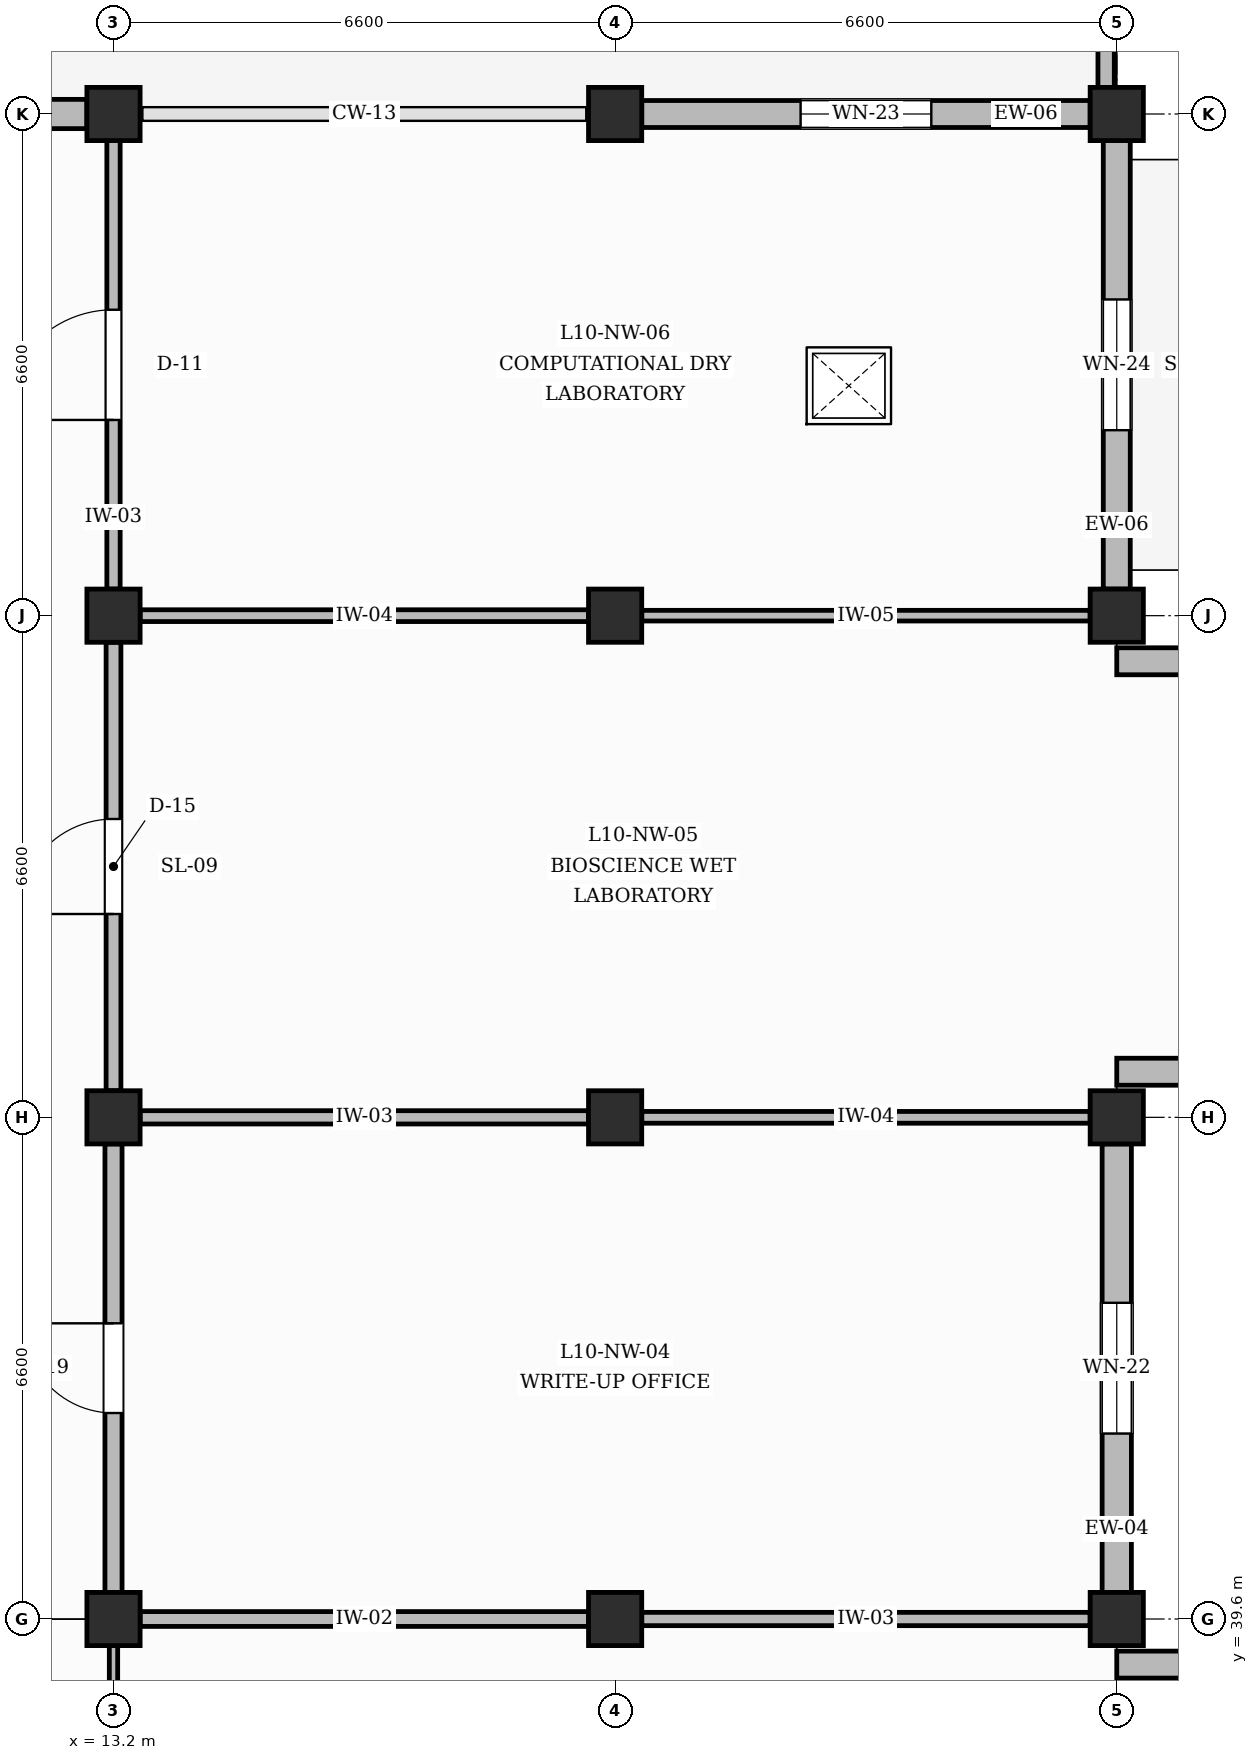
"""IFC4 building model, lengths in metres.
Left out: names, types, materials, properties, quantities, classifications, styles, units other than length and angle.
Written with IfcOpenShell. Run it as: python <this file> out.ifc"""

import sys

from ifc_helpers import new_model, si_unit, direction, frame, frame_2d, origin, origin_2d, place, context, subcontext, project, spatial, rectangle, extrude, element, fill, save


model = new_model("IFC4")
c1 = context("Model", 3, precision=1e-05, world=origin(), true_north=direction((0.0, 1.0)))
c2 = subcontext(c1, "Body", "Model", "MODEL_VIEW")
j1 = project(units=[si_unit("LENGTHUNIT", "METRE"), si_unit("PLANEANGLEUNIT", "RADIAN")], contexts=[c1])
p1 = place(None, origin())
s1 = spatial("IfcSite", under=j1, at=p1, CompositionType="ELEMENT")
p2 = place(p1, origin())
s2 = spatial("IfcBuilding", under=s1, at=p2, CompositionType="ELEMENT")
p3 = place(p2, frame((0.0, 0.0, 43.8)))
s3 = spatial("IfcBuildingStorey", under=s2, at=p3, CompositionType="ELEMENT", Elevation=43.8)
for number, where, z_axis, x_axis in (
    (1, (13.2, 39.6, 0.0), (0.0, 0.0, 1.0), (1.0, 0.0, 0.0)),
    (2, (13.2, 46.2, 0.0), (0.0, 0.0, 1.0), (1.0, 0.0, 0.0)),
    (3, (13.2, 52.8, 0.0), (0.0, 0.0, 1.0), (1.0, 0.0, 0.0)),
    (4, (13.2, 59.4, 0.0), (0.0, 0.0, 1.0), (1.0, 0.0, 0.0)),
    (5, (19.8, 39.6, 0.0), (0.0, 0.0, 1.0), (1.0, 0.0, 0.0)),
    (6, (19.8, 46.2, 0.0), (0.0, 0.0, 1.0), (1.0, 0.0, 0.0)),
    (7, (19.8, 52.8, 0.0), (0.0, 0.0, 1.0), (1.0, 0.0, 0.0)),
    (8, (19.8, 59.4, 0.0), (0.0, 0.0, 1.0), (1.0, 0.0, 0.0)),
    (9, (26.4, 39.6, 0.0), (0.0, 0.0, 1.0), (1.0, 0.0, 0.0)),
    (10, (26.4, 46.2, 0.0), (0.0, 0.0, 1.0), (1.0, 0.0, 0.0)),
    (11, (26.4, 52.8, 0.0), (0.0, 0.0, 1.0), (1.0, 0.0, 0.0)),
    (12, (26.4, 59.4, 0.0), (0.0, 0.0, 1.0), (1.0, 0.0, 0.0)),
):
    element("IfcColumn", number, at=place(p3, frame(where, z_axis=z_axis, x_axis=x_axis)), inside=s3, PredefinedType="COLUMN", context=c2, shape_type="SweptSolid", body=[
        extrude(rectangle(XDim=0.7, YDim=0.7, at=origin_2d()), origin(), (0.0, 0.0, 1.0), 4.2),
    ])
p4 = place(p3, frame((6.95, 59.4, 0.0), z_axis=(0.0, 0.0, 1.0), x_axis=(1.0, 0.0, 0.0)))
e13 = element("IfcWall", 13, at=p4, inside=s3, PredefinedType="SOLIDWALL", context=c2, shape_type="SweptSolid", body=[
    extrude(rectangle(XDim=5.9, YDim=0.385, at=frame_2d((2.95, 0.0))), origin(), (0.0, 0.0, 1.0), 3.29),
])
p5 = place(p4, frame((2.19, 0.0, 0.95)))
e14 = element("IfcOpeningElement", 14, at=p5, cuts=e13, PredefinedType="OPENING", context=c2, shape_type="SweptSolid", body=[
    extrude(rectangle(XDim=1.52, YDim=1.96, at=frame_2d((0.76, 0.98))), frame((0.0, 0.202, 0.0), z_axis=(0.0, -1.0, 0.0), x_axis=(1.0, 0.0, 0.0)), (0.0, 0.0, 1.0), 0.405),
])
p6 = place(p3, frame((26.4, 39.0, 0.0), z_axis=(0.0, 0.0, 1.0), x_axis=(1.0, 0.0, 0.0)))
e15 = element("IfcWall", 15, at=p6, inside=s3, PredefinedType="SOLIDWALL", context=c2, shape_type="SweptSolid", body=[
    extrude(rectangle(XDim=2.0, YDim=0.355, at=frame_2d((1.0, 0.0))), origin(), (0.0, 0.0, 1.0), 3.29),
])
p7 = place(p3, frame((26.4, 39.95, 0.0), z_axis=(0.0, 0.0, 1.0), x_axis=(0.0, 1.0, 0.0)))
e16 = element("IfcWall", 16, at=p7, inside=s3, PredefinedType="SOLIDWALL", context=c2, shape_type="SweptSolid", body=[
    extrude(rectangle(XDim=5.9, YDim=0.385, at=frame_2d((2.95, 0.0))), origin(), (0.0, 0.0, 1.0), 3.29),
])
p8 = place(p7, frame((2.09, 0.0, 0.95)))
e17 = element("IfcOpeningElement", 17, at=p8, cuts=e16, PredefinedType="OPENING", context=c2, shape_type="SweptSolid", body=[
    extrude(rectangle(XDim=1.72, YDim=1.52, at=frame_2d((0.86, 0.76))), frame((0.0, 0.202, 0.0), z_axis=(0.0, -1.0, 0.0), x_axis=(1.0, 0.0, 0.0)), (0.0, 0.0, 1.0), 0.405),
])
for number, where, z_axis, x_axis in (
    (18, (26.4, 46.8, 0.0), (0.0, 0.0, 1.0), (1.0, 0.0, 0.0)),
    (19, (26.4, 52.2, 0.0), (0.0, 0.0, 1.0), (1.0, 0.0, 0.0)),
):
    element("IfcWall", number, at=place(p3, frame(where, z_axis=z_axis, x_axis=x_axis)), inside=s3, PredefinedType="SOLIDWALL", context=c2, shape_type="SweptSolid", body=[
        extrude(rectangle(XDim=2.0, YDim=0.355, at=frame_2d((1.0, 0.0))), origin(), (0.0, 0.0, 1.0), 3.29),
    ])
p9 = place(p3, frame((20.15, 59.4, 0.0), z_axis=(0.0, 0.0, 1.0), x_axis=(1.0, 0.0, 0.0)))
e20 = element("IfcWall", 20, at=p9, inside=s3, PredefinedType="SOLIDWALL", context=c2, shape_type="SweptSolid", body=[
    extrude(rectangle(XDim=5.9, YDim=0.355, at=frame_2d((2.95, 0.0))), origin(), (0.0, 0.0, 1.0), 3.29),
])
p10 = place(p9, frame((2.09, 0.0, 0.95)))
e21 = element("IfcOpeningElement", 21, at=p10, cuts=e20, PredefinedType="OPENING", context=c2, shape_type="SweptSolid", body=[
    extrude(rectangle(XDim=1.72, YDim=1.74, at=frame_2d((0.86, 0.87))), frame((0.0, 0.188, 0.0), z_axis=(0.0, -1.0, 0.0), x_axis=(1.0, 0.0, 0.0)), (0.0, 0.0, 1.0), 0.375),
])
p11 = place(p3, frame((26.4, 53.15, 0.0), z_axis=(0.0, 0.0, 1.0), x_axis=(0.0, 1.0, 0.0)))
e22 = element("IfcWall", 22, at=p11, inside=s3, PredefinedType="SOLIDWALL", context=c2, shape_type="SweptSolid", body=[
    extrude(rectangle(XDim=5.9, YDim=0.355, at=frame_2d((2.95, 0.0))), origin(), (0.0, 0.0, 1.0), 3.29),
])
p12 = place(p11, frame((2.09, 0.0, 0.95)))
e23 = element("IfcOpeningElement", 23, at=p12, cuts=e22, PredefinedType="OPENING", context=c2, shape_type="SweptSolid", body=[
    extrude(rectangle(XDim=1.72, YDim=1.96, at=frame_2d((0.86, 0.98))), frame((0.0, 0.188, 0.0), z_axis=(0.0, -1.0, 0.0), x_axis=(1.0, 0.0, 0.0)), (0.0, 0.0, 1.0), 0.375),
])
p13 = place(p3, frame((26.26, 59.7, 0.0), z_axis=(0.0, 0.0, 1.0), x_axis=(0.0, 1.0, 0.0)))
e24 = element("IfcWall", 24, at=p13, inside=s3, PredefinedType="PARAPET", context=c2, shape_type="SweptSolid", body=[
    extrude(rectangle(XDim=6.0, YDim=0.215, at=frame_2d((3.0, 0.0))), origin(), (0.0, 0.0, 1.0), 1.15),
])
p14 = place(p3, frame((13.2, 33.35, 0.0), z_axis=(0.0, 0.0, 1.0), x_axis=(0.0, 1.0, 0.0)))
e25 = element("IfcWall", 25, at=p14, inside=s3, PredefinedType="PARTITIONING", context=c2, shape_type="SweptSolid", body=[
    extrude(rectangle(XDim=5.9, YDim=0.11, at=frame_2d((2.95, 0.0))), origin(), (0.0, 0.0, 1.0), 3.29),
])
p15 = place(p14, frame((2.275, 0.0, 0.0)))
e26 = element("IfcOpeningElement", 26, at=p15, cuts=e25, PredefinedType="OPENING", context=c2, shape_type="SweptSolid", body=[
    extrude(rectangle(XDim=1.35, YDim=2.3, at=frame_2d((0.675, 1.15))), frame((0.0, 0.065, 0.0), z_axis=(0.0, -1.0, 0.0), x_axis=(1.0, 0.0, 0.0)), (0.0, 0.0, 1.0), 0.13),
])
p16 = place(p3, frame((13.2, 39.95, 0.0), z_axis=(0.0, 0.0, 1.0), x_axis=(0.0, 1.0, 0.0)))
e27 = element("IfcWall", 27, at=p16, inside=s3, PredefinedType="PARTITIONING", context=c2, shape_type="SweptSolid", body=[
    extrude(rectangle(XDim=5.9, YDim=0.225, at=frame_2d((2.95, 0.0))), origin(), (0.0, 0.0, 1.0), 3.29),
])
p17 = place(p16, frame((2.36, 0.0, 0.0)))
e28 = element("IfcOpeningElement", 28, at=p17, cuts=e27, PredefinedType="OPENING", context=c2, shape_type="SweptSolid", body=[
    extrude(rectangle(XDim=1.18, YDim=2.2, at=frame_2d((0.59, 1.1))), frame((0.0, 0.123, 0.0), z_axis=(0.0, -1.0, 0.0), x_axis=(1.0, 0.0, 0.0)), (0.0, 0.0, 1.0), 0.245),
])
p18 = place(p3, frame((13.2, 46.55, 0.0), z_axis=(0.0, 0.0, 1.0), x_axis=(0.0, 1.0, 0.0)))
e29 = element("IfcWall", 29, at=p18, inside=s3, PredefinedType="PARTITIONING", context=c2, shape_type="SweptSolid", body=[
    extrude(rectangle(XDim=5.9, YDim=0.195, at=frame_2d((2.95, 0.0))), origin(), (0.0, 0.0, 1.0), 3.29),
])
p19 = place(p18, frame((2.325, 0.0, 0.0)))
e30 = element("IfcOpeningElement", 30, at=p19, cuts=e29, PredefinedType="OPENING", context=c2, shape_type="SweptSolid", body=[
    extrude(rectangle(XDim=1.25, YDim=2.25, at=frame_2d((0.625, 1.125))), frame((0.0, 0.107, 0.0), z_axis=(0.0, -1.0, 0.0), x_axis=(1.0, 0.0, 0.0)), (0.0, 0.0, 1.0), 0.215),
])
p20 = place(p3, frame((13.2, 53.15, 0.0), z_axis=(0.0, 0.0, 1.0), x_axis=(0.0, 1.0, 0.0)))
e31 = element("IfcWall", 31, at=p20, inside=s3, PredefinedType="PARTITIONING", context=c2, shape_type="SweptSolid", body=[
    extrude(rectangle(XDim=5.9, YDim=0.175, at=frame_2d((2.95, 0.0))), origin(), (0.0, 0.0, 1.0), 3.29),
])
p21 = place(p20, frame((2.225, 0.0, 0.0)))
e32 = element("IfcOpeningElement", 32, at=p21, cuts=e31, PredefinedType="OPENING", context=c2, shape_type="SweptSolid", body=[
    extrude(rectangle(XDim=1.45, YDim=2.25, at=frame_2d((0.725, 1.125))), frame((0.0, 0.097, 0.0), z_axis=(0.0, -1.0, 0.0), x_axis=(1.0, 0.0, 0.0)), (0.0, 0.0, 1.0), 0.195),
])
p22 = place(p3, frame((13.55, 39.6, 0.0), z_axis=(0.0, 0.0, 1.0), x_axis=(1.0, 0.0, 0.0)))
e33 = element("IfcWall", 33, at=p22, inside=s3, PredefinedType="PARTITIONING", context=c2, shape_type="SweptSolid", body=[
    extrude(rectangle(XDim=5.9, YDim=0.195, at=frame_2d((2.95, 0.0))), origin(), (0.0, 0.0, 1.0), 3.29),
])
p23 = place(p3, frame((13.55, 46.2, 0.0), z_axis=(0.0, 0.0, 1.0), x_axis=(1.0, 0.0, 0.0)))
e34 = element("IfcWall", 34, at=p23, inside=s3, PredefinedType="PARTITIONING", context=c2, shape_type="SweptSolid", body=[
    extrude(rectangle(XDim=5.9, YDim=0.175, at=frame_2d((2.95, 0.0))), origin(), (0.0, 0.0, 1.0), 3.29),
])
p24 = place(p3, frame((13.55, 52.8, 0.0), z_axis=(0.0, 0.0, 1.0), x_axis=(1.0, 0.0, 0.0)))
e35 = element("IfcWall", 35, at=p24, inside=s3, PredefinedType="PARTITIONING", context=c2, shape_type="SweptSolid", body=[
    extrude(rectangle(XDim=5.9, YDim=0.155, at=frame_2d((2.95, 0.0))), origin(), (0.0, 0.0, 1.0), 3.29),
])
p25 = place(p3, frame((20.15, 39.6, 0.0), z_axis=(0.0, 0.0, 1.0), x_axis=(1.0, 0.0, 0.0)))
e36 = element("IfcWall", 36, at=p25, inside=s3, PredefinedType="PARTITIONING", context=c2, shape_type="SweptSolid", body=[
    extrude(rectangle(XDim=5.9, YDim=0.175, at=frame_2d((2.95, 0.0))), origin(), (0.0, 0.0, 1.0), 3.44),
])
p26 = place(p3, frame((20.15, 46.2, 0.0), z_axis=(0.0, 0.0, 1.0), x_axis=(1.0, 0.0, 0.0)))
e37 = element("IfcWall", 37, at=p26, inside=s3, PredefinedType="PARTITIONING", context=c2, shape_type="SweptSolid", body=[
    extrude(rectangle(XDim=5.9, YDim=0.155, at=frame_2d((2.95, 0.0))), origin(), (0.0, 0.0, 1.0), 3.44),
])
p27 = place(p3, frame((20.15, 52.8, 0.0), z_axis=(0.0, 0.0, 1.0), x_axis=(1.0, 0.0, 0.0)))
e38 = element("IfcWall", 38, at=p27, inside=s3, PredefinedType="PARTITIONING", context=c2, shape_type="SweptSolid", body=[
    extrude(rectangle(XDim=5.9, YDim=0.14, at=frame_2d((2.95, 0.0))), origin(), (0.0, 0.0, 1.0), 3.44),
])
p28 = place(p8, origin())
e39 = element("IfcWindow", 39, at=p28, inside=s3, PartitioningType="DOUBLE_PANEL_VERTICAL", PredefinedType="WINDOW", context=c2, shape_type="SweptSolid", body=[
    extrude(rectangle(XDim=1.72, YDim=1.52, at=frame_2d((0.86, 0.76))), frame((0.0, 0.03, 0.0), z_axis=(0.0, -1.0, 0.0), x_axis=(1.0, 0.0, 0.0)), (0.0, 0.0, 1.0), 0.06),
])
fill(e17, e39)
p29 = place(p10, origin())
e40 = element("IfcWindow", 40, at=p29, inside=s3, PartitioningType="DOUBLE_PANEL_VERTICAL", PredefinedType="WINDOW", context=c2, shape_type="SweptSolid", body=[
    extrude(rectangle(XDim=1.72, YDim=1.74, at=frame_2d((0.86, 0.87))), frame((0.0, 0.03, 0.0), z_axis=(0.0, -1.0, 0.0), x_axis=(1.0, 0.0, 0.0)), (0.0, 0.0, 1.0), 0.06),
])
fill(e21, e40)
p30 = place(p12, origin())
e41 = element("IfcWindow", 41, at=p30, inside=s3, PartitioningType="DOUBLE_PANEL_VERTICAL", PredefinedType="WINDOW", context=c2, shape_type="SweptSolid", body=[
    extrude(rectangle(XDim=1.72, YDim=1.96, at=frame_2d((0.86, 0.98))), frame((0.0, 0.03, 0.0), z_axis=(0.0, -1.0, 0.0), x_axis=(1.0, 0.0, 0.0)), (0.0, 0.0, 1.0), 0.06),
])
fill(e23, e41)
p31 = place(p17, origin())
e42 = element("IfcDoor", 42, at=p31, inside=s3, OperationType="SINGLE_SWING_RIGHT", PredefinedType="DOOR", context=c2, shape_type="SweptSolid", body=[
    extrude(rectangle(XDim=1.18, YDim=2.2, at=frame_2d((0.59, 1.1))), frame((0.0, 0.025, 0.0), z_axis=(0.0, -1.0, 0.0), x_axis=(1.0, 0.0, 0.0)), (0.0, 0.0, 1.0), 0.05),
])
fill(e28, e42)
p32 = place(p19, origin())
e43 = element("IfcDoor", 43, at=p32, inside=s3, OperationType="SINGLE_SWING_LEFT", PredefinedType="DOOR", context=c2, shape_type="SweptSolid", body=[
    extrude(rectangle(XDim=1.25, YDim=2.25, at=frame_2d((0.625, 1.125))), frame((0.0, 0.025, 0.0), z_axis=(0.0, -1.0, 0.0), x_axis=(1.0, 0.0, 0.0)), (0.0, 0.0, 1.0), 0.05),
])
fill(e30, e43)
p33 = place(p21, origin())
e44 = element("IfcDoor", 44, at=p33, inside=s3, OperationType="SINGLE_SWING_LEFT", PredefinedType="DOOR", context=c2, shape_type="SweptSolid", body=[
    extrude(rectangle(XDim=1.45, YDim=2.25, at=frame_2d((0.725, 1.125))), frame((0.0, 0.025, 0.0), z_axis=(0.0, -1.0, 0.0), x_axis=(1.0, 0.0, 0.0)), (0.0, 0.0, 1.0), 0.05),
])
fill(e32, e44)
save(model, sys.argv[1])
